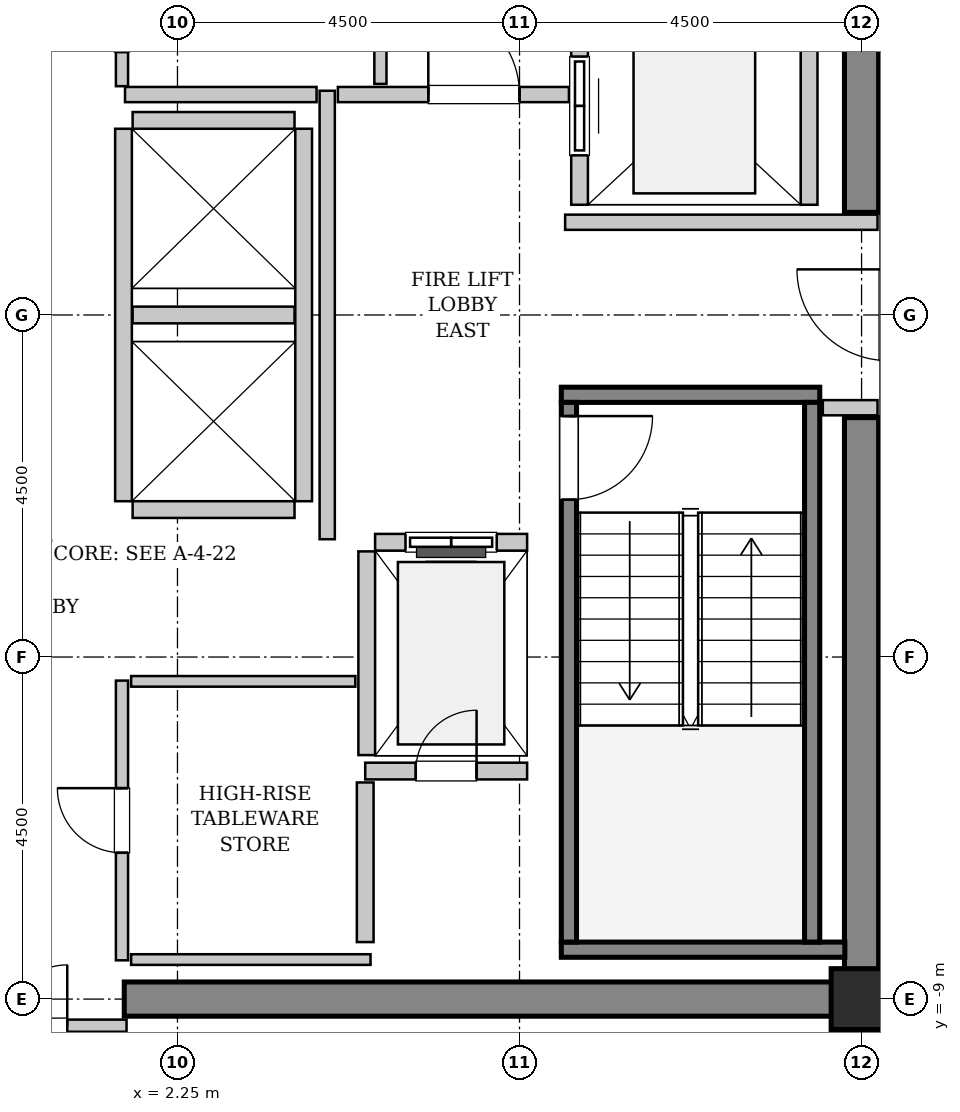
"""IFC4 building model, lengths in metres.
Left out: names, types, materials, properties, quantities, classifications, styles, units other than length and angle.
Written with IfcOpenShell. Run it as: python <this file> out.ifc"""

import sys

from ifc_helpers import new_model, si_unit, direction, frame, frame_2d, origin, origin_2d, place, context, subcontext, project, spatial, rectangle, hollow_rectangle, extrude, source, transform, mapped, element, fill, save


model = new_model("IFC4")
c1 = context("Model", 3, precision=1e-05, world=origin(), true_north=direction((0.0, 1.0)))
c2 = subcontext(c1, "Body", "Model", "MODEL_VIEW")
j1 = project(units=[si_unit("LENGTHUNIT", "METRE"), si_unit("PLANEANGLEUNIT", "RADIAN")], contexts=[c1])
p1 = place(None, origin())
s1 = spatial("IfcSite", under=j1, at=p1, CompositionType="ELEMENT")
p2 = place(p1, origin())
s2 = spatial("IfcBuilding", under=s1, at=p2, CompositionType="ELEMENT")
p3 = place(p2, frame((0.0, 0.0, 295.0)))
s3 = spatial("IfcBuildingStorey", under=s2, at=p3, CompositionType="ELEMENT", Elevation=295.0)
m1 = source(origin(), c2, "Body", "SweptSolid", [
    extrude(rectangle(XDim=9.925, YDim=0.45, at=frame_2d((4.962, 0.0))), origin(), (0.0, 0.0, 1.0), 3.8),
])
p4 = place(p3, frame((1.55, -9.0, 0.0), z_axis=(0.0, 0.0, 1.0), x_axis=(1.0, 0.0, 0.0)))
e1 = element("IfcWall", 1, at=p4, inside=s3, PredefinedType="SHEAR", context=c2, shape_type="MappedRepresentation", body=[
    mapped(m1, transform((0.0, 0.0, 0.0), x_axis=(1.0, 0.0, 0.0), y_axis=(0.0, 1.0, 0.0), z_axis=(0.0, 0.0, 1.0), scale=1.0)),
])
m2 = source(origin(), c2, "Body", "SweptSolid", [
    extrude(rectangle(XDim=7.425, YDim=0.45, at=frame_2d((3.712, 0.0))), origin(), (0.0, 0.0, 1.0), 3.8),
])
for number, where, z_axis, x_axis in (
    (2, (11.25, -8.775, 0.0), (0.0, 0.0, 1.0), (0.0, 1.0, 0.0)),
    (3, (11.25, 1.35, 0.0), (0.0, 0.0, 1.0), (0.0, 1.0, 0.0)),
):
    element("IfcWall", number, at=place(p3, frame(where, z_axis=z_axis, x_axis=x_axis)), inside=s3, PredefinedType="SHEAR", context=c2, shape_type="MappedRepresentation", body=[
        mapped(m2, transform((0.0, 0.0, 0.0), x_axis=(1.0, 0.0, 0.0), y_axis=(0.0, 1.0, 0.0), z_axis=(0.0, 0.0, 1.0), scale=1.0)),
    ])
m3 = source(origin(), c2, "Body", "SweptSolid", [
    extrude(hollow_rectangle(XDim=0.8, YDim=0.8, WallThickness=0.04, InnerFilletRadius=0.04, OuterFilletRadius=0.08, at=origin_2d()), origin(), (0.0, 0.0, 1.0), 3.8),
])
p5 = place(p3, frame((11.25, -9.0, 0.0), z_axis=(0.0, 0.0, 1.0), x_axis=(1.0, 0.0, 0.0)))
e4 = element("IfcColumn", 4, at=p5, inside=s3, PredefinedType="COLUMN", context=c2, shape_type="MappedRepresentation", body=[
    mapped(m3, transform((0.0, 0.0, 0.0), x_axis=(1.0, 0.0, 0.0), y_axis=(0.0, 1.0, 0.0), z_axis=(0.0, 0.0, 1.0), scale=1.0)),
])
m4 = source(origin(), c2, "Body", "SweptSolid", [
    extrude(rectangle(XDim=3.4, YDim=0.2, at=frame_2d((1.7, 0.0))), origin(), (0.0, 0.0, 1.0), 3.8),
])
p6 = place(p3, frame((7.3, -1.05, 0.0), z_axis=(0.0, 0.0, 1.0), x_axis=(1.0, 0.0, 0.0)))
e5 = element("IfcWall", 5, at=p6, inside=s3, PredefinedType="SOLIDWALL", context=c2, shape_type="MappedRepresentation", body=[
    mapped(m4, transform((0.0, 0.0, 0.0), x_axis=(1.0, 0.0, 0.0), y_axis=(0.0, 1.0, 0.0), z_axis=(0.0, 0.0, 1.0), scale=1.0)),
])
m5 = source(origin(), c2, "Body", "SweptSolid", [
    extrude(rectangle(XDim=3.73, YDim=0.2, at=frame_2d((1.865, 0.0))), origin(), (0.0, 0.0, 1.0), 3.8),
])
p7 = place(p3, frame((7.3, -8.35, 0.0), z_axis=(0.0, 0.0, 1.0), x_axis=(1.0, 0.0, 0.0)))
e6 = element("IfcWall", 6, at=p7, inside=s3, PredefinedType="SOLIDWALL", context=c2, shape_type="MappedRepresentation", body=[
    mapped(m5, transform((0.0, 0.0, 0.0), x_axis=(1.0, 0.0, 0.0), y_axis=(0.0, 1.0, 0.0), z_axis=(0.0, 0.0, 1.0), scale=1.0)),
])
m6 = source(origin(), c2, "Body", "SweptSolid", [
    extrude(rectangle(XDim=7.1, YDim=0.2, at=frame_2d((3.55, 0.0))), origin(), (0.0, 0.0, 1.0), 3.8),
])
p8 = place(p3, frame((7.4, -1.15, 0.0), z_axis=(0.0, 0.0, 1.0), x_axis=(0.0, -1.0, 0.0)))
e7 = element("IfcWall", 7, at=p8, inside=s3, PredefinedType="SOLIDWALL", context=c2, shape_type="MappedRepresentation", body=[
    mapped(m6, transform((0.0, 0.0, 0.0), x_axis=(1.0, 0.0, 0.0), y_axis=(0.0, 1.0, 0.0), z_axis=(0.0, 0.0, 1.0), scale=1.0)),
])
p9 = place(p8, frame((0.18, 0.0, 0.0)))
e8 = element("IfcOpeningElement", 8, at=p9, cuts=e7, PredefinedType="OPENING", context=c2, shape_type="SweptSolid", body=[
    extrude(rectangle(XDim=1.1, YDim=2.15, at=frame_2d((0.55, 1.075))), frame((0.0, 0.11, 0.0), z_axis=(0.0, -1.0, 0.0), x_axis=(1.0, 0.0, 0.0)), (0.0, 0.0, 1.0), 0.22),
])
p10 = place(p3, frame((10.6, -1.15, 0.0), z_axis=(0.0, 0.0, 1.0), x_axis=(0.0, -1.0, 0.0)))
e9 = element("IfcWall", 9, at=p10, inside=s3, PredefinedType="SOLIDWALL", context=c2, shape_type="MappedRepresentation", body=[
    mapped(m6, transform((0.0, 0.0, 0.0), x_axis=(1.0, 0.0, 0.0), y_axis=(0.0, 1.0, 0.0), z_axis=(0.0, 0.0, 1.0), scale=1.0)),
])
m7 = source(origin(), c2, "Body", "SweptSolid", [
    extrude(rectangle(XDim=2.0, YDim=0.22, at=frame_2d((1.0, 0.0))), origin(), (0.0, 0.0, 1.0), 3.535),
])
p11 = place(p3, frame((6.85, -2.99, 0.0), z_axis=(0.0, 0.0, 1.0), x_axis=(-1.0, 0.0, 0.0)))
e10 = element("IfcWall", 10, at=p11, inside=s3, PredefinedType="SOLIDWALL", context=c2, shape_type="MappedRepresentation", body=[
    mapped(m7, transform((0.0, 0.0, 0.0), x_axis=(1.0, 0.0, 0.0), y_axis=(0.0, 1.0, 0.0), z_axis=(0.0, 0.0, 1.0), scale=1.0)),
])
p12 = place(p11, frame((0.4, 0.0, 0.0)))
e11 = element("IfcOpeningElement", 11, at=p12, cuts=e10, PredefinedType="OPENING", context=c2, shape_type="SweptSolid", body=[
    extrude(rectangle(XDim=1.2, YDim=2.2, at=frame_2d((0.6, 1.1))), frame((0.0, 0.12, 0.0), z_axis=(0.0, -1.0, 0.0), x_axis=(1.0, 0.0, 0.0)), (0.0, 0.0, 1.0), 0.24),
])
m8 = source(origin(), c2, "Body", "SweptSolid", [
    extrude(rectangle(XDim=2.68, YDim=0.22, at=frame_2d((1.34, 0.0))), origin(), (0.0, 0.0, 1.0), 3.535),
])
p13 = place(p3, frame((4.74, -3.11, 0.0), z_axis=(0.0, 0.0, 1.0), x_axis=(0.0, -1.0, 0.0)))
e12 = element("IfcWall", 12, at=p13, inside=s3, PredefinedType="SOLIDWALL", context=c2, shape_type="MappedRepresentation", body=[
    mapped(m8, transform((0.0, 0.0, 0.0), x_axis=(1.0, 0.0, 0.0), y_axis=(0.0, 1.0, 0.0), z_axis=(0.0, 0.0, 1.0), scale=1.0)),
])
m9 = source(origin(), c2, "Body", "SweptSolid", [
    extrude(rectangle(XDim=5.45, YDim=0.22, at=frame_2d((2.725, 0.0))), origin(), (0.0, 0.0, 1.0), 3.535),
])
p14 = place(p3, frame((7.54, 6.9, 0.0), z_axis=(0.0, 0.0, 1.0), x_axis=(0.0, -1.0, 0.0)))
e13 = element("IfcWall", 13, at=p14, inside=s3, PredefinedType="SOLIDWALL", context=c2, shape_type="MappedRepresentation", body=[
    mapped(m9, transform((0.0, 0.0, 0.0), x_axis=(1.0, 0.0, 0.0), y_axis=(0.0, 1.0, 0.0), z_axis=(0.0, 0.0, 1.0), scale=1.0)),
])
p15 = place(p14, frame((3.5, 0.0, 0.0)))
e14 = element("IfcOpeningElement", 14, at=p15, cuts=e13, PredefinedType="OPENING", context=c2, shape_type="SweptSolid", body=[
    extrude(rectangle(XDim=1.3, YDim=2.3, at=frame_2d((0.65, 1.15))), frame((0.0, 0.12, 0.0), z_axis=(0.0, -1.0, 0.0), x_axis=(1.0, 0.0, 0.0)), (0.0, 0.0, 1.0), 0.24),
])
p16 = place(p14, frame((0.65, 0.0, 0.0)))
e15 = element("IfcOpeningElement", 15, at=p16, cuts=e13, PredefinedType="OPENING", context=c2, shape_type="SweptSolid", body=[
    extrude(rectangle(XDim=1.3, YDim=2.3, at=frame_2d((0.65, 1.15))), frame((0.0, 0.12, 0.0), z_axis=(0.0, -1.0, 0.0), x_axis=(1.0, 0.0, 0.0)), (0.0, 0.0, 1.0), 0.24),
])
p17 = place(p3, frame((10.56, 1.45, 0.0), z_axis=(0.0, 0.0, 1.0), x_axis=(0.0, 1.0, 0.0)))
e16 = element("IfcWall", 16, at=p17, inside=s3, PredefinedType="SOLIDWALL", context=c2, shape_type="MappedRepresentation", body=[
    mapped(m9, transform((0.0, 0.0, 0.0), x_axis=(1.0, 0.0, 0.0), y_axis=(0.0, 1.0, 0.0), z_axis=(0.0, 0.0, 1.0), scale=1.0)),
])
m10 = source(origin(), c2, "Body", "SweptSolid", [
    extrude(rectangle(XDim=4.9, YDim=0.22, at=frame_2d((2.45, 0.0))), origin(), (0.0, 0.0, 1.0), 3.535),
])
for number, where, z_axis, x_axis in (
    (17, (1.54, 2.45, 0.0), (0.0, 0.0, 1.0), (0.0, -1.0, 0.0)),
    (18, (3.91, -2.45, 0.0), (0.0, 0.0, 1.0), (0.0, 1.0, 0.0)),
):
    element("IfcWall", number, at=place(p3, frame(where, z_axis=z_axis, x_axis=x_axis)), inside=s3, PredefinedType="SOLIDWALL", context=c2, shape_type="MappedRepresentation", body=[
        mapped(m10, transform((0.0, 0.0, 0.0), x_axis=(1.0, 0.0, 0.0), y_axis=(0.0, 1.0, 0.0), z_axis=(0.0, 0.0, 1.0), scale=1.0)),
    ])
m11 = source(origin(), c2, "Body", "SweptSolid", [
    extrude(rectangle(XDim=2.13, YDim=0.22, at=frame_2d((1.065, 0.0))), origin(), (0.0, 0.0, 1.0), 3.535),
])
for number, where, z_axis, x_axis in (
    (19, (1.66, -2.56, 0.0), (0.0, 0.0, 1.0), (1.0, 0.0, 0.0)),
    (20, (1.66, 0.0, 0.0), (0.0, 0.0, 1.0), (1.0, 0.0, 0.0)),
    (21, (3.79, 2.56, 0.0), (0.0, 0.0, 1.0), (-1.0, 0.0, 0.0)),
):
    element("IfcWall", number, at=place(p3, frame(where, z_axis=z_axis, x_axis=x_axis)), inside=s3, PredefinedType="SOLIDWALL", context=c2, shape_type="MappedRepresentation", body=[
        mapped(m11, transform((0.0, 0.0, 0.0), x_axis=(1.0, 0.0, 0.0), y_axis=(0.0, 1.0, 0.0), z_axis=(0.0, 0.0, 1.0), scale=1.0)),
    ])
p18 = place(p3, frame((4.72, -6.0, 0.0), z_axis=(0.0, 0.0, 1.0), x_axis=(1.0, 0.0, 0.0)))
e22 = element("IfcWall", 22, at=p18, inside=s3, PredefinedType="SOLIDWALL", context=c2, shape_type="MappedRepresentation", body=[
    mapped(m11, transform((0.0, 0.0, 0.0), x_axis=(1.0, 0.0, 0.0), y_axis=(0.0, 1.0, 0.0), z_axis=(0.0, 0.0, 1.0), scale=1.0)),
])
p19 = place(p18, frame((0.665, 0.0, 0.0)))
e23 = element("IfcOpeningElement", 23, at=p19, cuts=e22, PredefinedType="OPENING", context=c2, shape_type="SweptSolid", body=[
    extrude(rectangle(XDim=0.8, YDim=2.0, at=frame_2d((0.4, 1.0))), frame((0.0, 0.12, 0.0), z_axis=(0.0, -1.0, 0.0), x_axis=(1.0, 0.0, 0.0)), (0.0, 0.0, 1.0), 0.24),
])
m12 = source(origin(), c2, "Body", "SweptSolid", [
    extrude(rectangle(XDim=2.1, YDim=0.22, at=frame_2d((1.05, 0.0))), origin(), (0.0, 0.0, 1.0), 3.535),
])
p20 = place(p3, frame((4.72, -8.25, 0.0), z_axis=(0.0, 0.0, 1.0), x_axis=(0.0, 1.0, 0.0)))
e24 = element("IfcWall", 24, at=p20, inside=s3, PredefinedType="SOLIDWALL", context=c2, shape_type="MappedRepresentation", body=[
    mapped(m12, transform((0.0, 0.0, 0.0), x_axis=(1.0, 0.0, 0.0), y_axis=(0.0, 1.0, 0.0), z_axis=(0.0, 0.0, 1.0), scale=1.0)),
])
m13 = source(origin(), c2, "Body", "SweptSolid", [
    extrude(rectangle(XDim=5.9, YDim=0.2, at=frame_2d((2.95, 0.0))), origin(), (0.0, 0.0, 1.0), 3.535),
])
p21 = place(p3, frame((4.22, -2.95, 0.0), z_axis=(0.0, 0.0, 1.0), x_axis=(0.0, 1.0, 0.0)))
e25 = element("IfcWall", 25, at=p21, inside=s3, PredefinedType="PARTITIONING", context=c2, shape_type="MappedRepresentation", body=[
    mapped(m13, transform((0.0, 0.0, 0.0), x_axis=(1.0, 0.0, 0.0), y_axis=(0.0, 1.0, 0.0), z_axis=(0.0, 0.0, 1.0), scale=1.0)),
])
m14 = source(origin(), c2, "Body", "SweptSolid", [
    extrude(rectangle(XDim=2.52, YDim=0.2, at=frame_2d((1.26, 0.0))), origin(), (0.0, 0.0, 1.0), 3.535),
])
p22 = place(p3, frame((1.56, 2.9, 0.0), z_axis=(0.0, 0.0, 1.0), x_axis=(1.0, 0.0, 0.0)))
e26 = element("IfcWall", 26, at=p22, inside=s3, PredefinedType="PARTITIONING", context=c2, shape_type="MappedRepresentation", body=[
    mapped(m14, transform((0.0, 0.0, 0.0), x_axis=(1.0, 0.0, 0.0), y_axis=(0.0, 1.0, 0.0), z_axis=(0.0, 0.0, 1.0), scale=1.0)),
])
m15 = source(origin(), c2, "Body", "SweptSolid", [
    extrude(rectangle(XDim=3.04, YDim=0.2, at=frame_2d((1.52, 0.0))), origin(), (0.0, 0.0, 1.0), 3.535),
])
p23 = place(p3, frame((4.36, 2.9, 0.0), z_axis=(0.0, 0.0, 1.0), x_axis=(1.0, 0.0, 0.0)))
e27 = element("IfcWall", 27, at=p23, inside=s3, PredefinedType="PARTITIONING", context=c2, shape_type="MappedRepresentation", body=[
    mapped(m15, transform((0.0, 0.0, 0.0), x_axis=(1.0, 0.0, 0.0), y_axis=(0.0, 1.0, 0.0), z_axis=(0.0, 0.0, 1.0), scale=1.0)),
])
p24 = place(p23, frame((1.19, 0.0, 0.0)))
e28 = element("IfcOpeningElement", 28, at=p24, cuts=e27, PredefinedType="OPENING", context=c2, shape_type="SweptSolid", body=[
    extrude(rectangle(XDim=1.2, YDim=2.15, at=frame_2d((0.6, 1.075))), frame((0.0, 0.11, 0.0), z_axis=(0.0, -1.0, 0.0), x_axis=(1.0, 0.0, 0.0)), (0.0, 0.0, 1.0), 0.22),
])
m16 = source(origin(), c2, "Body", "SweptSolid", [
    extrude(rectangle(XDim=4.11, YDim=0.2, at=frame_2d((2.055, 0.0))), origin(), (0.0, 0.0, 1.0), 3.535),
])
p25 = place(p3, frame((7.35, 1.22, 0.0), z_axis=(0.0, 0.0, 1.0), x_axis=(1.0, 0.0, 0.0)))
e29 = element("IfcWall", 29, at=p25, inside=s3, PredefinedType="PARTITIONING", context=c2, shape_type="MappedRepresentation", body=[
    mapped(m16, transform((0.0, 0.0, 0.0), x_axis=(1.0, 0.0, 0.0), y_axis=(0.0, 1.0, 0.0), z_axis=(0.0, 0.0, 1.0), scale=1.0)),
])
m17 = source(origin(), c2, "Body", "SweptSolid", [
    extrude(rectangle(XDim=0.72, YDim=0.2, at=frame_2d((0.36, 0.0))), origin(), (0.0, 0.0, 1.0), 3.535),
])
p26 = place(p3, frame((10.74, -1.22, 0.0), z_axis=(0.0, 0.0, 1.0), x_axis=(1.0, 0.0, 0.0)))
e30 = element("IfcWall", 30, at=p26, inside=s3, PredefinedType="PARTITIONING", context=c2, shape_type="MappedRepresentation", body=[
    mapped(m17, transform((0.0, 0.0, 0.0), x_axis=(1.0, 0.0, 0.0), y_axis=(0.0, 1.0, 0.0), z_axis=(0.0, 0.0, 1.0), scale=1.0)),
])
m18 = source(origin(), c2, "Body", "SweptSolid", [
    extrude(rectangle(XDim=3.16, YDim=0.16, at=frame_2d((1.58, 0.0))), origin(), (0.0, 0.0, 1.0), 2.625),
])
p27 = place(p3, frame((-1.58, -9.35, 0.0), z_axis=(0.0, 0.0, 1.0), x_axis=(1.0, 0.0, 0.0)))
e31 = element("IfcWall", 31, at=p27, inside=s3, PredefinedType="PARTITIONING", context=c2, shape_type="MappedRepresentation", body=[
    mapped(m18, transform((0.0, 0.0, 0.0), x_axis=(1.0, 0.0, 0.0), y_axis=(0.0, 1.0, 0.0), z_axis=(0.0, 0.0, 1.0), scale=1.0)),
])
p28 = place(p27, frame((0.78, 0.0, 0.0)))
e32 = element("IfcOpeningElement", 32, at=p28, cuts=e31, PredefinedType="OPENING", context=c2, shape_type="SweptSolid", body=[
    extrude(rectangle(XDim=1.6, YDim=2.3, at=frame_2d((0.8, 1.15))), frame((0.0, 0.09, 0.0), z_axis=(0.0, -1.0, 0.0), x_axis=(1.0, 0.0, 0.0)), (0.0, 0.0, 1.0), 0.18),
])
m19 = source(origin(), c2, "Body", "SweptSolid", [
    extrude(rectangle(XDim=5.45, YDim=0.16, at=frame_2d((2.725, 0.0))), origin(), (0.0, 0.0, 1.0), 3.535),
])
p29 = place(p3, frame((4.92, 3.04, 0.0), z_axis=(0.0, 0.0, 1.0), x_axis=(0.0, 1.0, 0.0)))
e33 = element("IfcWall", 33, at=p29, inside=s3, PredefinedType="PARTITIONING", context=c2, shape_type="MappedRepresentation", body=[
    mapped(m19, transform((0.0, 0.0, 0.0), x_axis=(1.0, 0.0, 0.0), y_axis=(0.0, 1.0, 0.0), z_axis=(0.0, 0.0, 1.0), scale=1.0)),
])
m20 = source(origin(), c2, "Body", "SweptSolid", [
    extrude(rectangle(XDim=1.75, YDim=0.16, at=frame_2d((0.875, 0.0))), origin(), (0.0, 0.0, 1.0), 3.535),
])
p30 = place(p3, frame((1.52, 3.01, 0.0), z_axis=(0.0, 0.0, 1.0), x_axis=(0.0, 1.0, 0.0)))
e34 = element("IfcWall", 34, at=p30, inside=s3, PredefinedType="PARTITIONING", context=c2, shape_type="MappedRepresentation", body=[
    mapped(m20, transform((0.0, 0.0, 0.0), x_axis=(1.0, 0.0, 0.0), y_axis=(0.0, 1.0, 0.0), z_axis=(0.0, 0.0, 1.0), scale=1.0)),
])
p31 = place(p30, frame((0.45, 0.0, 0.0)))
e35 = element("IfcOpeningElement", 35, at=p31, cuts=e34, PredefinedType="OPENING", context=c2, shape_type="SweptSolid", body=[
    extrude(rectangle(XDim=0.85, YDim=2.1, at=frame_2d((0.425, 1.05))), frame((0.0, 0.09, 0.0), z_axis=(0.0, -1.0, 0.0), x_axis=(1.0, 0.0, 0.0)), (0.0, 0.0, 1.0), 0.18),
])
m21 = source(origin(), c2, "Body", "SweptSolid", [
    extrude(rectangle(XDim=3.68, YDim=0.16, at=frame_2d((1.84, 0.0))), origin(), (0.0, 0.0, 1.0), 3.535),
])
p32 = place(p3, frame((1.52, -8.49, 0.0), z_axis=(0.0, 0.0, 1.0), x_axis=(0.0, 1.0, 0.0)))
e36 = element("IfcWall", 36, at=p32, inside=s3, PredefinedType="PARTITIONING", context=c2, shape_type="MappedRepresentation", body=[
    mapped(m21, transform((0.0, 0.0, 0.0), x_axis=(1.0, 0.0, 0.0), y_axis=(0.0, 1.0, 0.0), z_axis=(0.0, 0.0, 1.0), scale=1.0)),
])
p33 = place(p32, frame((1.415, 0.0, 0.0)))
e37 = element("IfcOpeningElement", 37, at=p33, cuts=e36, PredefinedType="OPENING", context=c2, shape_type="SweptSolid", body=[
    extrude(rectangle(XDim=0.85, YDim=2.1, at=frame_2d((0.425, 1.05))), frame((0.0, 0.09, 0.0), z_axis=(0.0, -1.0, 0.0), x_axis=(1.0, 0.0, 0.0)), (0.0, 0.0, 1.0), 0.18),
])
m22 = source(origin(), c2, "Body", "SweptSolid", [
    extrude(rectangle(XDim=2.95, YDim=0.14, at=frame_2d((1.475, 0.0))), origin(), (0.0, 0.0, 1.0), 3.535),
])
p34 = place(p3, frame((1.64, -4.82, 0.0), z_axis=(0.0, 0.0, 1.0), x_axis=(1.0, 0.0, 0.0)))
e38 = element("IfcWall", 38, at=p34, inside=s3, PredefinedType="PARTITIONING", context=c2, shape_type="MappedRepresentation", body=[
    mapped(m22, transform((0.0, 0.0, 0.0), x_axis=(1.0, 0.0, 0.0), y_axis=(0.0, 1.0, 0.0), z_axis=(0.0, 0.0, 1.0), scale=1.0)),
])
m23 = source(origin(), c2, "Body", "SweptSolid", [
    extrude(rectangle(XDim=3.15, YDim=0.14, at=frame_2d((1.575, 0.0))), origin(), (0.0, 0.0, 1.0), 3.535),
])
p35 = place(p3, frame((1.64, -8.48, 0.0), z_axis=(0.0, 0.0, 1.0), x_axis=(1.0, 0.0, 0.0)))
e39 = element("IfcWall", 39, at=p35, inside=s3, PredefinedType="PARTITIONING", context=c2, shape_type="MappedRepresentation", body=[
    mapped(m23, transform((0.0, 0.0, 0.0), x_axis=(1.0, 0.0, 0.0), y_axis=(0.0, 1.0, 0.0), z_axis=(0.0, 0.0, 1.0), scale=1.0)),
])
m24 = source(origin(), c2, "Body", "SweptSolid", [
    extrude(rectangle(XDim=1.1, YDim=2.15, at=frame_2d((0.55, 1.075))), frame((0.0, 0.025, 0.0), z_axis=(0.0, -1.0, 0.0), x_axis=(1.0, 0.0, 0.0)), (0.0, 0.0, 1.0), 0.05),
])
p36 = place(p9, origin())
e40 = element("IfcDoor", 40, at=p36, inside=s3, OperationType="SINGLE_SWING_LEFT", PredefinedType="DOOR", context=c2, shape_type="MappedRepresentation", body=[
    mapped(m24, transform((0.0, 0.0, 0.0), x_axis=(1.0, 0.0, 0.0), y_axis=(0.0, 1.0, 0.0), z_axis=(0.0, 0.0, 1.0), scale=1.0)),
])
fill(e8, e40)
m25 = source(origin(), c2, "Body", "SweptSolid", [
    extrude(rectangle(XDim=1.2, YDim=2.2, at=frame_2d((0.6, 1.1))), frame((0.0, 0.025, 0.0), z_axis=(0.0, -1.0, 0.0), x_axis=(1.0, 0.0, 0.0)), (0.0, 0.0, 1.0), 0.05),
])
p37 = place(p12, origin())
e41 = element("IfcDoor", 41, at=p37, inside=s3, OperationType="SLIDING_TO_LEFT", PredefinedType="DOOR", context=c2, shape_type="MappedRepresentation", body=[
    mapped(m25, transform((0.0, 0.0, 0.0), x_axis=(1.0, 0.0, 0.0), y_axis=(0.0, 1.0, 0.0), z_axis=(0.0, 0.0, 1.0), scale=1.0)),
])
fill(e11, e41)
m26 = source(origin(), c2, "Body", "SweptSolid", [
    extrude(rectangle(XDim=1.3, YDim=2.3, at=frame_2d((0.65, 1.15))), frame((0.0, 0.025, 0.0), z_axis=(0.0, -1.0, 0.0), x_axis=(1.0, 0.0, 0.0)), (0.0, 0.0, 1.0), 0.05),
])
p38 = place(p15, origin())
e42 = element("IfcDoor", 42, at=p38, inside=s3, OperationType="SLIDING_TO_RIGHT", PredefinedType="DOOR", context=c2, shape_type="MappedRepresentation", body=[
    mapped(m26, transform((0.0, 0.0, 0.0), x_axis=(1.0, 0.0, 0.0), y_axis=(0.0, 1.0, 0.0), z_axis=(0.0, 0.0, 1.0), scale=1.0)),
])
fill(e14, e42)
m27 = source(origin(), c2, "Body", "SweptSolid", [
    extrude(rectangle(XDim=0.8, YDim=2.0, at=frame_2d((0.4, 1.0))), frame((0.0, 0.025, 0.0), z_axis=(0.0, -1.0, 0.0), x_axis=(1.0, 0.0, 0.0)), (0.0, 0.0, 1.0), 0.05),
])
p39 = place(p19, origin())
e43 = element("IfcDoor", 43, at=p39, inside=s3, OperationType="SINGLE_SWING_RIGHT", PredefinedType="TRAPDOOR", context=c2, shape_type="MappedRepresentation", body=[
    mapped(m27, transform((0.0, 0.0, 0.0), x_axis=(1.0, 0.0, 0.0), y_axis=(0.0, 1.0, 0.0), z_axis=(0.0, 0.0, 1.0), scale=1.0)),
])
fill(e23, e43)
m28 = source(origin(), c2, "Body", "SweptSolid", [
    extrude(rectangle(XDim=1.2, YDim=2.15, at=frame_2d((0.6, 1.075))), frame((0.0, 0.025, 0.0), z_axis=(0.0, -1.0, 0.0), x_axis=(1.0, 0.0, 0.0)), (0.0, 0.0, 1.0), 0.05),
])
p40 = place(p24, origin())
e44 = element("IfcDoor", 44, at=p40, inside=s3, OperationType="SINGLE_SWING_LEFT", PredefinedType="DOOR", context=c2, shape_type="MappedRepresentation", body=[
    mapped(m28, transform((0.0, 0.0, 0.0), x_axis=(1.0, 0.0, 0.0), y_axis=(0.0, 1.0, 0.0), z_axis=(0.0, 0.0, 1.0), scale=1.0)),
])
fill(e28, e44)
m29 = source(origin(), c2, "Body", "SweptSolid", [
    extrude(rectangle(XDim=1.6, YDim=2.3, at=frame_2d((0.8, 1.15))), frame((0.0, 0.025, 0.0), z_axis=(0.0, -1.0, 0.0), x_axis=(1.0, 0.0, 0.0)), (0.0, 0.0, 1.0), 0.05),
])
p41 = place(p28, origin())
e45 = element("IfcDoor", 45, at=p41, inside=s3, OperationType="DOUBLE_DOOR_SINGLE_SWING", PredefinedType="DOOR", context=c2, shape_type="MappedRepresentation", body=[
    mapped(m29, transform((0.0, 0.0, 0.0), x_axis=(1.0, 0.0, 0.0), y_axis=(0.0, 1.0, 0.0), z_axis=(0.0, 0.0, 1.0), scale=1.0)),
])
fill(e32, e45)
m30 = source(origin(), c2, "Body", "SweptSolid", [
    extrude(rectangle(XDim=0.85, YDim=2.1, at=frame_2d((0.425, 1.05))), frame((0.0, 0.025, 0.0), z_axis=(0.0, -1.0, 0.0), x_axis=(1.0, 0.0, 0.0)), (0.0, 0.0, 1.0), 0.05),
])
p42 = place(p33, origin())
e46 = element("IfcDoor", 46, at=p42, inside=s3, OperationType="SINGLE_SWING_RIGHT", PredefinedType="DOOR", context=c2, shape_type="MappedRepresentation", body=[
    mapped(m30, transform((0.0, 0.0, 0.0), x_axis=(1.0, 0.0, 0.0), y_axis=(0.0, 1.0, 0.0), z_axis=(0.0, 0.0, 1.0), scale=1.0)),
])
fill(e37, e46)
save(model, sys.argv[1])
